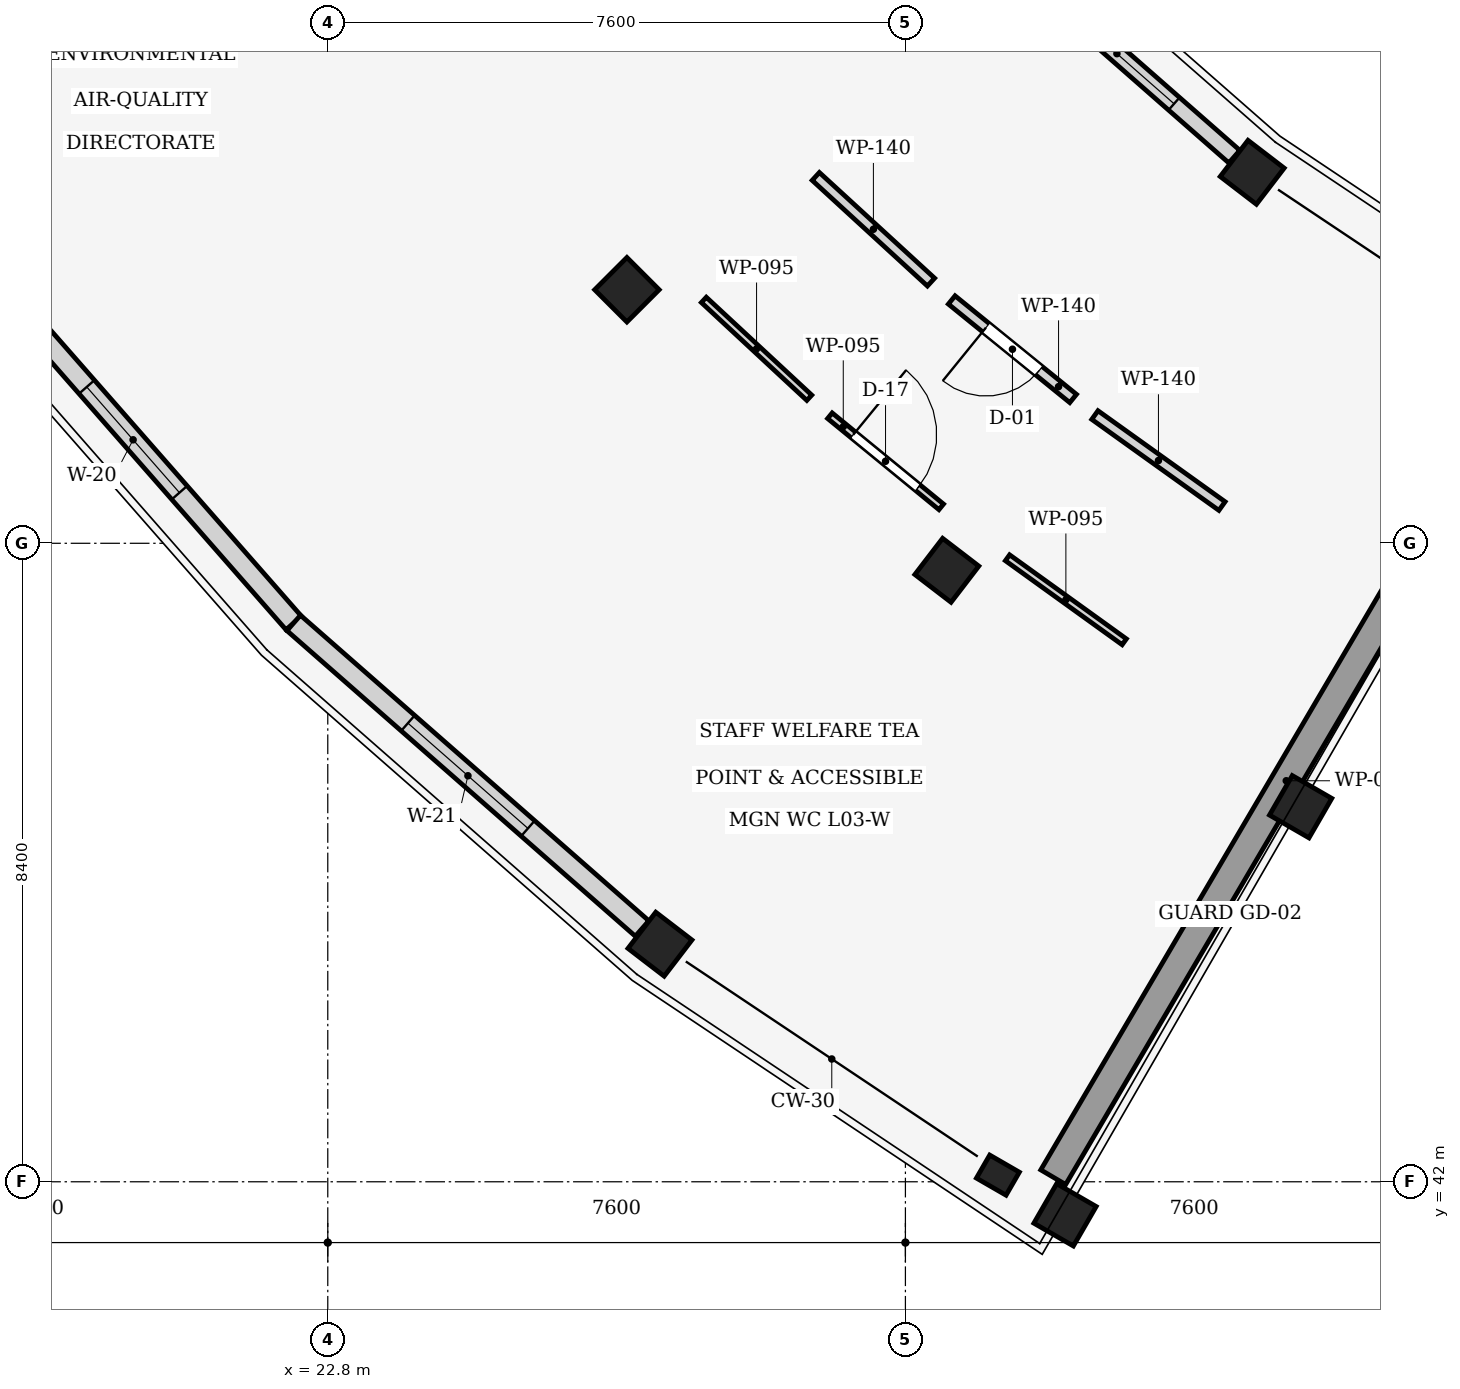
"""IFC4 building model, lengths in metres.
Left out: names, types, materials, properties, quantities, classifications, styles, units other than length and angle.
Written with IfcOpenShell. Run it as: python <this file> out.ifc"""

import sys

from ifc_helpers import new_model, si_unit, direction, frame, frame_2d, origin, origin_2d, place, context, subcontext, project, spatial, rectangle, extrude, element, fill, save


model = new_model("IFC4")
c1 = context("Model", 3, precision=1e-05, world=origin(), true_north=direction((0.0, 1.0)))
c2 = subcontext(c1, "Body", "Model", "MODEL_VIEW")
j1 = project(units=[si_unit("LENGTHUNIT", "METRE"), si_unit("PLANEANGLEUNIT", "RADIAN")], contexts=[c1])
p1 = place(None, origin())
s1 = spatial("IfcSite", under=j1, at=p1, CompositionType="ELEMENT")
p2 = place(p1, origin())
s2 = spatial("IfcBuilding", under=s1, at=p2, CompositionType="ELEMENT")
p3 = place(p2, frame((0.0, 0.0, 13.2)))
s3 = spatial("IfcBuildingStorey", under=s2, at=p3, CompositionType="ELEMENT", Elevation=13.2)
for number, where, z_axis, x_axis in (
    (1, (26.736, 53.736, 0.0), (0.0, 0.0, 1.0), (-0.707, -0.707, 0.0)),
    (2, (34.963, 55.281, 0.0), (0.0, 0.0, 1.0), (-0.609, -0.793, 0.0)),
    (3, (30.945, 50.044, 0.0), (0.0, 0.0, 1.0), (-0.609, -0.793, 0.0)),
    (4, (27.171, 45.126, 0.0), (0.0, 0.0, 1.0), (-0.609, -0.793, 0.0)),
    (5, (35.6, 46.934, 0.0), (0.0, 0.0, 1.0), (-0.5, -0.866, 0.0)),
    (6, (32.5, 41.565, 0.0), (0.0, 0.0, 1.0), (-0.5, -0.866, 0.0)),
):
    element("IfcColumn", number, at=place(p3, frame(where, z_axis=z_axis, x_axis=x_axis)), inside=s3, PredefinedType="COLUMN", context=c2, shape_type="SweptSolid", body=[
        extrude(rectangle(XDim=0.6, YDim=0.6, at=origin_2d()), origin(), (0.0, 0.0, 1.0), 4.05),
    ])
p4 = place(p3, frame((31.617, 42.087, 0.0), z_axis=(0.0, 0.0, 1.0), x_axis=(-0.5, -0.866025403784, 0.0)))
e7 = element("IfcColumn", 7, at=p4, inside=s3, PredefinedType="PILASTER", context=c2, shape_type="SweptSolid", body=[
    extrude(rectangle(XDim=0.35, YDim=0.45, at=origin_2d()), origin(), (0.0, 0.0, 1.0), 4.05),
])
p5 = place(p3, frame((22.352, 49.352, 0.0), z_axis=(0.0, 0.0, 1.0), x_axis=(-0.659350951881, 0.751835302612, 0.0)))
e8 = element("IfcWall", 8, at=p5, inside=s3, PredefinedType="STANDARD", context=c2, shape_type="SweptSolid", body=[
    extrude(rectangle(XDim=6.409, YDim=0.27, at=frame_2d((3.205, 0.0))), origin(), (0.0, 0.0, 1.0), 3.7),
])
p6 = place(p5, frame((2.28, 0.0, 0.85)))
e9 = element("IfcOpeningElement", 9, at=p6, cuts=e8, PredefinedType="OPENING", context=c2, shape_type="SweptSolid", body=[
    extrude(rectangle(XDim=1.85, YDim=1.65, at=frame_2d((0.925, 0.825))), frame((0.0, 0.145, 0.0), z_axis=(0.0, -1.0, 0.0), x_axis=(1.0, 0.0, 0.0)), (0.0, 0.0, 1.0), 0.29),
])
p7 = place(p3, frame((26.936, 45.332, 0.0), z_axis=(0.0, 0.0, 1.0), x_axis=(-0.751841992355, 0.659343323718, 0.0)))
e10 = element("IfcWall", 10, at=p7, inside=s3, PredefinedType="STANDARD", context=c2, shape_type="SweptSolid", body=[
    extrude(rectangle(XDim=6.097, YDim=0.27, at=frame_2d((3.048, 0.0))), origin(), (0.0, 0.0, 1.0), 3.015),
])
p8 = place(p7, frame((1.998, 0.0, 0.85)))
e11 = element("IfcOpeningElement", 11, at=p8, cuts=e10, PredefinedType="OPENING", context=c2, shape_type="SweptSolid", body=[
    extrude(rectangle(XDim=2.1, YDim=1.65, at=frame_2d((1.05, 0.825))), frame((0.0, 0.145, 0.0), z_axis=(0.0, -1.0, 0.0), x_axis=(1.0, 0.0, 0.0)), (0.0, 0.0, 1.0), 0.29),
])
p9 = place(p3, frame((31.638, 58.197, 0.0), z_axis=(0.0, 0.0, 1.0), x_axis=(0.751866047308, -0.659315893108, 0.0)))
e12 = element("IfcWall", 12, at=p9, inside=s3, PredefinedType="STANDARD", context=c2, shape_type="SweptSolid", body=[
    extrude(rectangle(XDim=4.11, YDim=0.22, at=frame_2d((2.055, 0.0))), origin(), (0.0, 0.0, 1.0), 3.165),
])
p10 = place(p9, frame((1.055, 0.0, 0.85)))
e13 = element("IfcOpeningElement", 13, at=p10, cuts=e12, PredefinedType="OPENING", context=c2, shape_type="SweptSolid", body=[
    extrude(rectangle(XDim=2.0, YDim=1.85, at=frame_2d((1.0, 0.925))), frame((0.0, 0.12, 0.0), z_axis=(0.0, -1.0, 0.0), x_axis=(1.0, 0.0, 0.0)), (0.0, 0.0, 1.0), 0.24),
])
p11 = place(p3, frame((38.477, 52.491, 0.0), z_axis=(0.0, 0.0, 1.0), x_axis=(-0.506804958987, -0.862060748177, 0.0)))
e14 = element("IfcWall", 14, at=p11, inside=s3, PredefinedType="SHEAR", context=c2, shape_type="SweptSolid", body=[
    extrude(rectangle(XDim=12.1, YDim=0.38, at=frame_2d((6.05, 0.0))), origin(), (0.0, 0.0, 1.0), 3.75),
])
p12 = place(p3, frame((29.406, 52.078, 0.0), z_axis=(0.0, 0.0, 1.0), x_axis=(0.773784863967, -0.633448485905, 0.0)))
e15 = element("IfcWall", 15, at=p12, inside=s3, PredefinedType="PARTITIONING", context=c2, shape_type="SweptSolid", body=[
    extrude(rectangle(XDim=1.893, YDim=0.095, at=frame_2d((0.946, 0.0))), origin(), (0.0, 0.0, 1.0), 3.7),
])
p13 = place(p12, frame((0.396, 0.0, 0.0)))
e16 = element("IfcOpeningElement", 16, at=p13, cuts=e15, PredefinedType="OPENING", context=c2, shape_type="SweptSolid", body=[
    extrude(rectangle(XDim=1.1, YDim=2.35, at=frame_2d((0.55, 1.175))), frame((0.0, 0.057, 0.0), z_axis=(0.0, -1.0, 0.0), x_axis=(1.0, 0.0, 0.0)), (0.0, 0.0, 1.0), 0.115),
])
p14 = place(p3, frame((27.748, 53.602, 0.0), z_axis=(0.0, 0.0, 1.0), x_axis=(0.73299099387, -0.680238342719, 0.0)))
e17 = element("IfcWall", 17, at=p14, inside=s3, PredefinedType="PARTITIONING", context=c2, shape_type="SweptSolid", body=[
    extrude(rectangle(XDim=1.893, YDim=0.095, at=frame_2d((0.946, 0.0))), origin(), (0.0, 0.0, 1.0), 3.7),
])
p15 = place(p3, frame((31.743, 50.21, 0.0), z_axis=(0.0, 0.0, 1.0), x_axis=(0.81161017958, -0.584199380693, 0.0)))
e18 = element("IfcWall", 18, at=p15, inside=s3, PredefinedType="PARTITIONING", context=c2, shape_type="SweptSolid", body=[
    extrude(rectangle(XDim=1.893, YDim=0.095, at=frame_2d((0.946, 0.0))), origin(), (0.0, 0.0, 1.0), 3.7),
])
p16 = place(p3, frame((32.607, 52.305, 0.0), z_axis=(0.0, 0.0, 1.0), x_axis=(-0.776531308722, 0.630078666973, 0.0)))
e19 = element("IfcWall", 19, at=p16, inside=s3, PredefinedType="PARTITIONING", context=c2, shape_type="SweptSolid", body=[
    extrude(rectangle(XDim=2.057, YDim=0.14, at=frame_2d((1.029, 0.0))), origin(), (0.0, 0.0, 1.0), 3.015),
])
p17 = place(p16, frame((0.578, 0.0, 0.0)))
e20 = element("IfcOpeningElement", 20, at=p17, cuts=e19, PredefinedType="OPENING", context=c2, shape_type="SweptSolid", body=[
    extrude(rectangle(XDim=0.9, YDim=2.1, at=frame_2d((0.45, 1.05))), frame((0.0, 0.08, 0.0), z_axis=(0.0, -1.0, 0.0), x_axis=(1.0, 0.0, 0.0)), (0.0, 0.0, 1.0), 0.16),
])
p18 = place(p3, frame((30.737, 53.836, 0.0), z_axis=(0.0, 0.0, 1.0), x_axis=(-0.737006331673, 0.675885838788, 0.0)))
e21 = element("IfcWall", 21, at=p18, inside=s3, PredefinedType="PARTITIONING", context=c2, shape_type="SweptSolid", body=[
    extrude(rectangle(XDim=2.057, YDim=0.14, at=frame_2d((1.029, 0.0))), origin(), (0.0, 0.0, 1.0), 3.7),
])
p19 = place(p3, frame((34.565, 50.89, 0.0), z_axis=(0.0, 0.0, 1.0), x_axis=(-0.813203802369, 0.581979016642, 0.0)))
e22 = element("IfcWall", 22, at=p19, inside=s3, PredefinedType="PARTITIONING", context=c2, shape_type="SweptSolid", body=[
    extrude(rectangle(XDim=2.057, YDim=0.14, at=frame_2d((1.028, 0.0))), origin(), (0.0, 0.0, 1.0), 3.015),
])
p20 = place(p6, origin())
e23 = element("IfcWindow", 23, at=p20, inside=s3, PartitioningType="SINGLE_PANEL", PredefinedType="WINDOW", context=c2, shape_type="SweptSolid", body=[
    extrude(rectangle(XDim=1.85, YDim=1.65, at=frame_2d((0.925, 0.825))), frame((0.0, 0.03, 0.0), z_axis=(0.0, -1.0, 0.0), x_axis=(1.0, 0.0, 0.0)), (0.0, 0.0, 1.0), 0.06),
])
fill(e9, e23)
p21 = place(p8, origin())
e24 = element("IfcWindow", 24, at=p21, inside=s3, PartitioningType="SINGLE_PANEL", PredefinedType="WINDOW", context=c2, shape_type="SweptSolid", body=[
    extrude(rectangle(XDim=2.1, YDim=1.65, at=frame_2d((1.05, 0.825))), frame((0.0, 0.03, 0.0), z_axis=(0.0, -1.0, 0.0), x_axis=(1.0, 0.0, 0.0)), (0.0, 0.0, 1.0), 0.06),
])
fill(e11, e24)
p22 = place(p10, origin())
e25 = element("IfcWindow", 25, at=p22, inside=s3, PartitioningType="SINGLE_PANEL", PredefinedType="WINDOW", context=c2, shape_type="SweptSolid", body=[
    extrude(rectangle(XDim=2.0, YDim=1.85, at=frame_2d((1.0, 0.925))), frame((0.0, 0.03, 0.0), z_axis=(0.0, -1.0, 0.0), x_axis=(1.0, 0.0, 0.0)), (0.0, 0.0, 1.0), 0.06),
])
fill(e13, e25)
p23 = place(p13, origin())
e26 = element("IfcDoor", 26, at=p23, inside=s3, OperationType="SINGLE_SWING_LEFT", PredefinedType="DOOR", context=c2, shape_type="SweptSolid", body=[
    extrude(rectangle(XDim=1.1, YDim=2.35, at=frame_2d((0.55, 1.175))), frame((0.0, 0.025, 0.0), z_axis=(0.0, -1.0, 0.0), x_axis=(1.0, 0.0, 0.0)), (0.0, 0.0, 1.0), 0.05),
])
fill(e16, e26)
p24 = place(p17, origin())
e27 = element("IfcDoor", 27, at=p24, inside=s3, OperationType="SINGLE_SWING_RIGHT", PredefinedType="DOOR", context=c2, shape_type="SweptSolid", body=[
    extrude(rectangle(XDim=0.9, YDim=2.1, at=frame_2d((0.45, 1.05))), frame((0.0, 0.025, 0.0), z_axis=(0.0, -1.0, 0.0), x_axis=(1.0, 0.0, 0.0)), (0.0, 0.0, 1.0), 0.05),
])
fill(e20, e27)
save(model, sys.argv[1])
